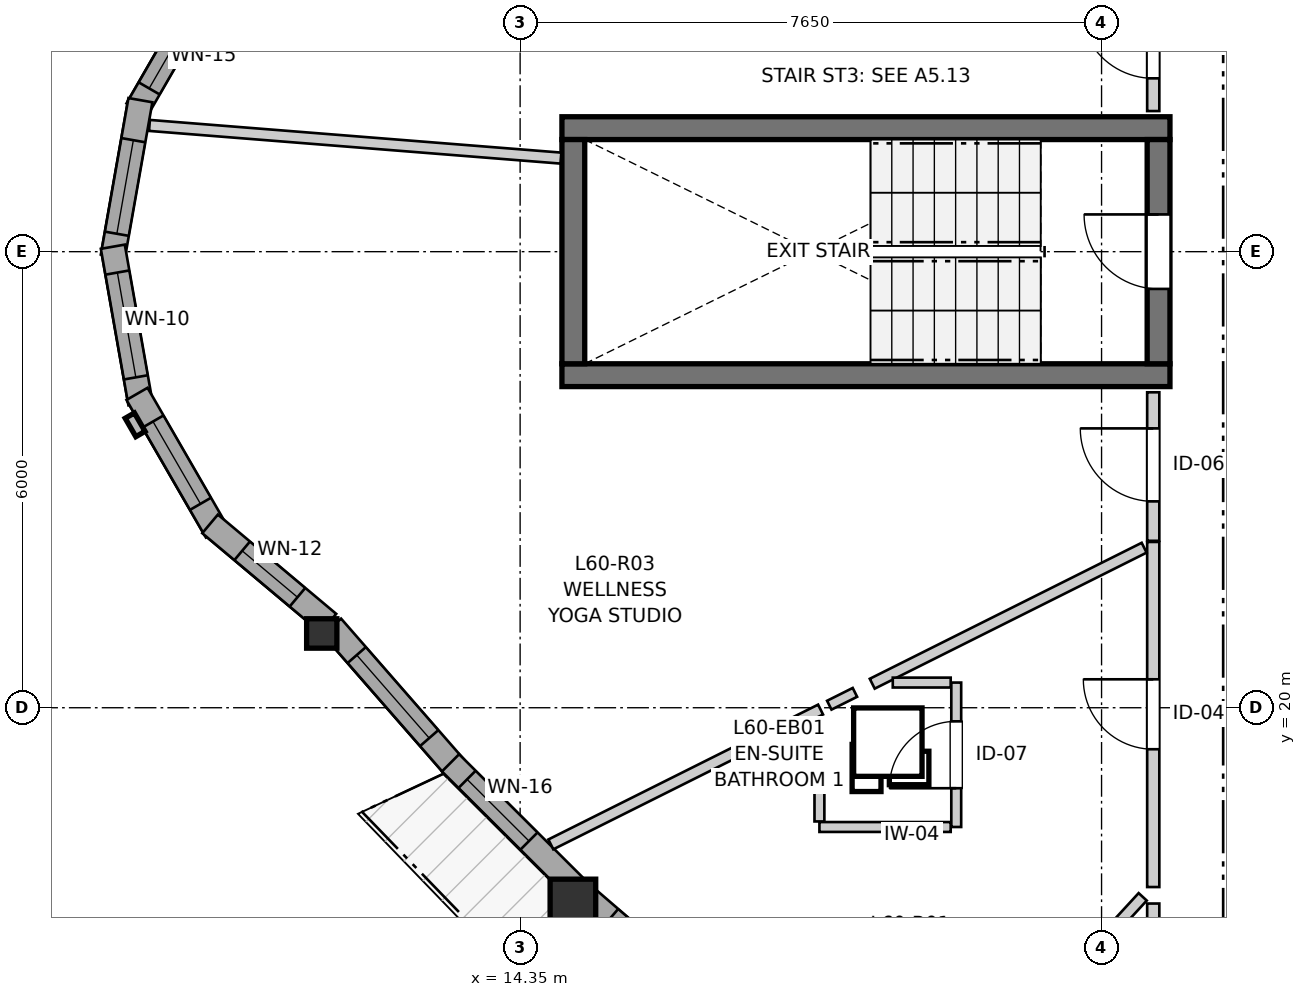
"""IFC4 building model, lengths in metres.
Left out: names, types, materials, properties, quantities, classifications, styles, units other than length and angle.
Written with IfcOpenShell. Run it as: python <this file> out.ifc"""

import sys

from ifc_helpers import new_model, si_unit, direction, frame, frame_2d, origin, origin_2d, place, context, subcontext, project, spatial, rectangle, i_section, extrude, source, transform, mapped, element, fill, save


model = new_model("IFC4")
c1 = context("Model", 3, precision=1e-05, world=origin(), true_north=direction((0.0, 1.0)))
c2 = subcontext(c1, "Body", "Model", "MODEL_VIEW")
j1 = project(units=[si_unit("LENGTHUNIT", "METRE"), si_unit("PLANEANGLEUNIT", "RADIAN")], contexts=[c1])
p1 = place(None, origin())
s1 = spatial("IfcSite", under=j1, at=p1, CompositionType="ELEMENT")
p2 = place(p1, origin())
s2 = spatial("IfcBuilding", under=s1, at=p2, CompositionType="ELEMENT")
p3 = place(p2, frame((0.0, 0.0, 202.0)))
s3 = spatial("IfcBuildingStorey", under=s2, at=p3, CompositionType="ELEMENT", Elevation=202.0)
for number, where, z_axis, x_axis in (
    (1, (14.9, 24.375, 0.0), (0.0, 0.0, 1.0), (1.0, 0.0, 0.0)),
    (2, (22.9, 27.625, 0.0), (0.0, 0.0, 1.0), (-1.0, 0.0, 0.0)),
):
    element("IfcWall", number, at=place(p3, frame(where, z_axis=z_axis, x_axis=x_axis)), inside=s3, PredefinedType="SHEAR", context=c2, shape_type="SweptSolid", body=[
        extrude(rectangle(XDim=8.0, YDim=0.3, at=frame_2d((4.0, 0.0))), origin(), (0.0, 0.0, 1.0), 2.935),
    ])
p4 = place(p3, frame((15.05, 27.475, 0.0), z_axis=(0.0, 0.0, 1.0), x_axis=(0.0, -1.0, 0.0)))
e3 = element("IfcWall", 3, at=p4, inside=s3, PredefinedType="SHEAR", context=c2, shape_type="SweptSolid", body=[
    extrude(rectangle(XDim=2.95, YDim=0.3, at=frame_2d((1.475, 0.0))), origin(), (0.0, 0.0, 1.0), 2.935),
])
p5 = place(p3, frame((22.75, 24.525, 0.0), z_axis=(0.0, 0.0, 1.0), x_axis=(0.0, 1.0, 0.0)))
e4 = element("IfcWall", 4, at=p5, inside=s3, PredefinedType="SHEAR", context=c2, shape_type="SweptSolid", body=[
    extrude(rectangle(XDim=2.95, YDim=0.3, at=frame_2d((1.475, 0.0))), origin(), (0.0, 0.0, 1.0), 2.935),
])
p6 = place(p5, frame((0.985, 0.0, 0.0)))
e5 = element("IfcOpeningElement", 5, at=p6, cuts=e4, PredefinedType="OPENING", context=c2, shape_type="SweptSolid", body=[
    extrude(rectangle(XDim=0.98, YDim=2.15, at=frame_2d((0.49, 1.075))), frame((0.0, 0.16, 0.0), z_axis=(0.0, -1.0, 0.0), x_axis=(1.0, 0.0, 0.0)), (0.0, 0.0, 1.0), 0.32),
])
m1 = source(origin(), c2, "Body", "SweptSolid", [
    extrude(i_section(OverallWidth=0.398, OverallDepth=0.387, WebThickness=0.019, FlangeThickness=0.03, FilletRadius=0.015, at=origin_2d()), origin(), (0.0, 0.0, 1.0), 2.935),
])
p7 = place(p3, frame((11.74, 20.977, 0.0), z_axis=(0.0, 0.0, 1.0), x_axis=(1.0, 0.0, 0.0)))
e6 = element("IfcColumn", 6, at=p7, inside=s3, PredefinedType="PILASTER", context=c2, shape_type="MappedRepresentation", body=[
    mapped(m1, transform((0.0, 0.0, 0.0), x_axis=(1.0, 0.0, 0.0), y_axis=(0.0, 1.0, 0.0), z_axis=(0.0, 0.0, 1.0), scale=1.0)),
])
m2 = source(origin(), c2, "Body", "SweptSolid", [
    extrude(rectangle(XDim=0.6, YDim=0.6, at=origin_2d()), origin(), (0.0, 0.0, 1.0), 2.935),
])
p8 = place(p3, frame((15.044, 17.445, 0.0), z_axis=(0.0, 0.0, 1.0), x_axis=(1.0, 0.0, 0.0)))
e7 = element("IfcColumn", 7, at=p8, inside=s3, PredefinedType="COLUMN", context=c2, shape_type="MappedRepresentation", body=[
    mapped(m2, transform((0.0, 0.0, 0.0), x_axis=(1.0, 0.0, 0.0), y_axis=(0.0, 1.0, 0.0), z_axis=(0.0, 0.0, 1.0), scale=1.0)),
])
p9 = place(p3, frame((10.354, 29.681, 0.0), z_axis=(0.0, 0.0, 1.0), x_axis=(-0.499995423472, -0.866028046028, 0.0)))
e8 = element("IfcWall", 8, at=p9, inside=s3, PredefinedType="SOLIDWALL", context=c2, shape_type="SweptSolid", body=[
    extrude(rectangle(XDim=2.09, YDim=0.32, at=frame_2d((1.045, 0.0))), origin(), (0.0, 0.0, 1.0), 2.555),
])
p10 = place(p9, frame((0.32, 0.0, 0.82)))
e9 = element("IfcOpeningElement", 9, at=p10, cuts=e8, PredefinedType="OPENING", context=c2, shape_type="SweptSolid", body=[
    extrude(rectangle(XDim=1.45, YDim=1.25, at=frame_2d((0.725, 0.625))), frame((0.0, 0.17, 0.0), z_axis=(0.0, -1.0, 0.0), x_axis=(1.0, 0.0, 0.0)), (0.0, 0.0, 1.0), 0.34),
])
p11 = place(p3, frame((9.354, 27.993, 0.0), z_axis=(0.0, 0.0, 1.0), x_axis=(-0.173672066494, -0.984803540469, 0.0)))
e10 = element("IfcWall", 10, at=p11, inside=s3, PredefinedType="SOLIDWALL", context=c2, shape_type="SweptSolid", body=[
    extrude(rectangle(XDim=2.09, YDim=0.32, at=frame_2d((1.045, 0.0))), origin(), (0.0, 0.0, 1.0), 2.555),
])
p12 = place(p11, frame((0.535, 0.0, 0.82)))
e11 = element("IfcOpeningElement", 11, at=p12, cuts=e10, PredefinedType="OPENING", context=c2, shape_type="SweptSolid", body=[
    extrude(rectangle(XDim=1.25, YDim=1.35, at=frame_2d((0.625, 0.675))), frame((0.0, 0.17, 0.0), z_axis=(0.0, -1.0, 0.0), x_axis=(1.0, 0.0, 0.0)), (0.0, 0.0, 1.0), 0.34),
])
p13 = place(p3, frame((8.991, 26.065, 0.0), z_axis=(0.0, 0.0, 1.0), x_axis=(0.173672066494, -0.984803540469, 0.0)))
e12 = element("IfcWall", 12, at=p13, inside=s3, PredefinedType="SOLIDWALL", context=c2, shape_type="SweptSolid", body=[
    extrude(rectangle(XDim=2.09, YDim=0.32, at=frame_2d((1.045, 0.0))), origin(), (0.0, 0.0, 1.0), 2.555),
])
p14 = place(p13, frame((0.345, 0.0, 0.82)))
e13 = element("IfcOpeningElement", 13, at=p14, cuts=e12, PredefinedType="OPENING", context=c2, shape_type="SweptSolid", body=[
    extrude(rectangle(XDim=1.4, YDim=1.35, at=frame_2d((0.7, 0.675))), frame((0.0, 0.17, 0.0), z_axis=(0.0, -1.0, 0.0), x_axis=(1.0, 0.0, 0.0)), (0.0, 0.0, 1.0), 0.34),
])
p15 = place(p3, frame((9.309, 24.129, 0.0), z_axis=(0.0, 0.0, 1.0), x_axis=(0.499995423472, -0.866028046028, 0.0)))
e14 = element("IfcWall", 14, at=p15, inside=s3, PredefinedType="SOLIDWALL", context=c2, shape_type="SweptSolid", body=[
    extrude(rectangle(XDim=2.09, YDim=0.32, at=frame_2d((1.045, 0.0))), origin(), (0.0, 0.0, 1.0), 2.555),
])
p16 = place(p15, frame((0.42, 0.0, 0.82)))
e15 = element("IfcOpeningElement", 15, at=p16, cuts=e14, PredefinedType="OPENING", context=c2, shape_type="SweptSolid", body=[
    extrude(rectangle(XDim=1.25, YDim=1.35, at=frame_2d((0.625, 0.675))), frame((0.0, 0.17, 0.0), z_axis=(0.0, -1.0, 0.0), x_axis=(1.0, 0.0, 0.0)), (0.0, 0.0, 1.0), 0.34),
])
p17 = place(p3, frame((10.271, 22.419, 0.0), z_axis=(0.0, 0.0, 1.0), x_axis=(0.766099948115, -0.642721455608, 0.0)))
e16 = element("IfcWall", 16, at=p17, inside=s3, PredefinedType="SOLIDWALL", context=c2, shape_type="SweptSolid", body=[
    extrude(rectangle(XDim=2.032, YDim=0.32, at=frame_2d((1.016, 0.0))), origin(), (0.0, 0.0, 1.0), 2.555),
])
p18 = place(p17, frame((0.551, 0.0, 0.82)))
e17 = element("IfcOpeningElement", 17, at=p18, cuts=e16, PredefinedType="OPENING", context=c2, shape_type="SweptSolid", body=[
    extrude(rectangle(XDim=0.95, YDim=1.35, at=frame_2d((0.475, 0.675))), frame((0.0, 0.17, 0.0), z_axis=(0.0, -1.0, 0.0), x_axis=(1.0, 0.0, 0.0)), (0.0, 0.0, 1.0), 0.34),
])
p19 = place(p3, frame((11.874, 21.067, 0.0), z_axis=(0.0, 0.0, 1.0), x_axis=(0.657571063417, -0.753392524888, 0.0)))
e18 = element("IfcWall", 18, at=p19, inside=s3, PredefinedType="SOLIDWALL", context=c2, shape_type="SweptSolid", body=[
    extrude(rectangle(XDim=2.464, YDim=0.32, at=frame_2d((1.232, 0.0))), origin(), (0.0, 0.0, 1.0), 2.555),
])
p20 = place(p19, frame((0.497, 0.0, 0.82)))
e19 = element("IfcOpeningElement", 19, at=p20, cuts=e18, PredefinedType="OPENING", context=c2, shape_type="SweptSolid", body=[
    extrude(rectangle(XDim=1.45, YDim=1.25, at=frame_2d((0.725, 0.625))), frame((0.0, 0.17, 0.0), z_axis=(0.0, -1.0, 0.0), x_axis=(1.0, 0.0, 0.0)), (0.0, 0.0, 1.0), 0.34),
])
p21 = place(p3, frame((13.434, 19.275, 0.0), z_axis=(0.0, 0.0, 1.0), x_axis=(0.708408377073, -0.705802784985, 0.0)))
e20 = element("IfcWall", 20, at=p21, inside=s3, PredefinedType="SOLIDWALL", context=c2, shape_type="SweptSolid", body=[
    extrude(rectangle(XDim=2.343, YDim=0.32, at=frame_2d((1.171, 0.0))), origin(), (0.0, 0.0, 1.0), 2.555),
])
p22 = place(p21, frame((0.308, 0.0, 0.82)))
e21 = element("IfcOpeningElement", 21, at=p22, cuts=e20, PredefinedType="OPENING", context=c2, shape_type="SweptSolid", body=[
    extrude(rectangle(XDim=1.15, YDim=1.2, at=frame_2d((0.575, 0.6))), frame((0.0, 0.17, 0.0), z_axis=(0.0, -1.0, 0.0), x_axis=(1.0, 0.0, 0.0)), (0.0, 0.0, 1.0), 0.34),
])
p23 = place(p3, frame((15.217, 17.507, 0.0), z_axis=(0.0, 0.0, 1.0), x_axis=(0.757473216355, -0.652866239366, 0.0)))
e22 = element("IfcWall", 22, at=p23, inside=s3, PredefinedType="SOLIDWALL", context=c2, shape_type="SweptSolid", body=[
    extrude(rectangle(XDim=2.303, YDim=0.32, at=frame_2d((1.152, 0.0))), origin(), (0.0, 0.0, 1.0), 2.555),
])
p24 = place(p23, frame((0.422, 0.0, 0.82)))
e23 = element("IfcOpeningElement", 23, at=p24, cuts=e22, PredefinedType="OPENING", context=c2, shape_type="SweptSolid", body=[
    extrude(rectangle(XDim=1.45, YDim=1.25, at=frame_2d((0.725, 0.625))), frame((0.0, 0.17, 0.0), z_axis=(0.0, -1.0, 0.0), x_axis=(1.0, 0.0, 0.0)), (0.0, 0.0, 1.0), 0.34),
])
p25 = place(p3, frame((22.68, 17.641, 0.0), z_axis=(0.0, 0.0, 1.0), x_axis=(0.0, 1.0, 0.0)))
e24 = element("IfcWall", 24, at=p25, inside=s3, PredefinedType="PARTITIONING", context=c2, shape_type="SweptSolid", body=[
    extrude(rectangle(XDim=4.54, YDim=0.16, at=frame_2d((2.27, 0.0))), origin(), (0.0, 0.0, 1.0), 2.935),
])
p26 = place(p25, frame((1.813, 0.0, 0.0)))
e25 = element("IfcOpeningElement", 25, at=p26, cuts=e24, PredefinedType="OPENING", context=c2, shape_type="SweptSolid", body=[
    extrude(rectangle(XDim=0.92, YDim=2.1, at=frame_2d((0.46, 1.05))), frame((0.0, 0.09, 0.0), z_axis=(0.0, -1.0, 0.0), x_axis=(1.0, 0.0, 0.0)), (0.0, 0.0, 1.0), 0.18),
])
p27 = place(p3, frame((22.68, 22.196, 0.0), z_axis=(0.0, 0.0, 1.0), x_axis=(0.0, 1.0, 0.0)))
e26 = element("IfcWall", 26, at=p27, inside=s3, PredefinedType="PARTITIONING", context=c2, shape_type="SweptSolid", body=[
    extrude(rectangle(XDim=1.954, YDim=0.16, at=frame_2d((0.977, 0.0))), origin(), (0.0, 0.0, 1.0), 2.935),
])
p28 = place(p27, frame((0.519, 0.0, 0.0)))
e27 = element("IfcOpeningElement", 27, at=p28, cuts=e26, PredefinedType="OPENING", context=c2, shape_type="SweptSolid", body=[
    extrude(rectangle(XDim=0.96, YDim=2.1, at=frame_2d((0.48, 1.05))), frame((0.0, 0.09, 0.0), z_axis=(0.0, -1.0, 0.0), x_axis=(1.0, 0.0, 0.0)), (0.0, 0.0, 1.0), 0.18),
])
p29 = place(p3, frame((20.088, 18.431, 0.0), z_axis=(0.0, 0.0, 1.0), x_axis=(0.0, 1.0, 0.0)))
e28 = element("IfcWall", 28, at=p29, inside=s3, PredefinedType="PARTITIONING", context=c2, shape_type="SweptSolid", body=[
    extrude(rectangle(XDim=1.9, YDim=0.13, at=frame_2d((0.95, 0.0))), origin(), (0.0, 0.0, 1.0), 2.935),
])
p30 = place(p29, frame((0.51, 0.0, 0.0)))
e29 = element("IfcOpeningElement", 29, at=p30, cuts=e28, PredefinedType="OPENING", context=c2, shape_type="SweptSolid", body=[
    extrude(rectangle(XDim=0.88, YDim=2.05, at=frame_2d((0.44, 1.025))), frame((0.0, 0.075, 0.0), z_axis=(0.0, -1.0, 0.0), x_axis=(1.0, 0.0, 0.0)), (0.0, 0.0, 1.0), 0.15),
])
p31 = place(p3, frame((22.68, 27.85, 0.0), z_axis=(0.0, 0.0, 1.0), x_axis=(0.0, 1.0, 0.0)))
e30 = element("IfcWall", 30, at=p31, inside=s3, PredefinedType="PARTITIONING", context=c2, shape_type="SweptSolid", body=[
    extrude(rectangle(XDim=1.731, YDim=0.16, at=frame_2d((0.865, 0.0))), origin(), (0.0, 0.0, 1.0), 2.935),
])
p32 = place(p31, frame((0.43, 0.0, 0.0)))
e31 = element("IfcOpeningElement", 31, at=p32, cuts=e30, PredefinedType="OPENING", context=c2, shape_type="SweptSolid", body=[
    extrude(rectangle(XDim=0.96, YDim=2.1, at=frame_2d((0.48, 1.05))), frame((0.0, 0.09, 0.0), z_axis=(0.0, -1.0, 0.0), x_axis=(1.0, 0.0, 0.0)), (0.0, 0.0, 1.0), 0.18),
])
p33 = place(p3, frame((9.473, 27.661, 0.0), z_axis=(0.0, 0.0, 1.0), x_axis=(0.996864548282, -0.079126938392, 0.0)))
e32 = element("IfcWall", 32, at=p33, inside=s3, PredefinedType="PARTITIONING", context=c2, shape_type="SweptSolid", body=[
    extrude(rectangle(XDim=5.43, YDim=0.145, at=frame_2d((2.715, 0.0))), origin(), (0.0, 0.0, 1.0), 2.935),
])
p34 = place(p3, frame((19.625, 14.343, 0.0), z_axis=(0.0, 0.0, 1.0), x_axis=(0.677104421975, 0.735886949023, 0.0)))
e33 = element("IfcWall", 33, at=p34, inside=s3, PredefinedType="PARTITIONING", context=c2, shape_type="SweptSolid", body=[
    extrude(rectangle(XDim=4.307, YDim=0.145, at=frame_2d((2.153, 0.0))), origin(), (0.0, 0.0, 1.0), 2.935),
])
p35 = place(p3, frame((18.983, 20.316, 0.0), z_axis=(0.0, 0.0, 1.0), x_axis=(0.894366146285, 0.447335664104, 0.0)))
e34 = element("IfcWall", 34, at=p35, inside=s3, PredefinedType="PARTITIONING", context=c2, shape_type="SweptSolid", body=[
    extrude(rectangle(XDim=4.0, YDim=0.145, at=frame_2d((2.0, 0.0))), origin(), (0.0, 0.0, 1.0), 2.935),
])
p36 = place(p3, frame((14.754, 18.202, 0.0), z_axis=(0.0, 0.0, 1.0), x_axis=(0.894464106055, 0.44713975777, 0.0)))
e35 = element("IfcWall", 35, at=p36, inside=s3, PredefinedType="PARTITIONING", context=c2, shape_type="SweptSolid", body=[
    extrude(rectangle(XDim=3.968, YDim=0.145, at=frame_2d((1.984, 0.0))), origin(), (0.0, 0.0, 1.0), 2.935),
])
p37 = place(p3, frame((22.68, 15.796, 0.0), z_axis=(0.0, 0.0, 1.0), x_axis=(0.0, 1.0, 0.0)))
e36 = element("IfcWall", 36, at=p37, inside=s3, PredefinedType="PARTITIONING", context=c2, shape_type="SweptSolid", body=[
    extrude(rectangle(XDim=1.628, YDim=0.16, at=frame_2d((0.814, 0.0))), origin(), (0.0, 0.0, 1.0), 2.935),
])
p38 = place(p3, frame((18.288, 18.431, 0.0), z_axis=(0.0, 0.0, 1.0), x_axis=(1.0, 0.0, 0.0)))
e37 = element("IfcWall", 37, at=p38, inside=s3, PredefinedType="PARTITIONING", context=c2, shape_type="SweptSolid", body=[
    extrude(rectangle(XDim=1.727, YDim=0.13, at=frame_2d((0.863, 0.0))), origin(), (0.0, 0.0, 1.0), 2.935),
])
p39 = place(p3, frame((18.288, 18.504, 0.0), z_axis=(0.0, 0.0, 1.0), x_axis=(0.0, 1.0, 0.0)))
e38 = element("IfcWall", 38, at=p39, inside=s3, PredefinedType="PARTITIONING", context=c2, shape_type="SweptSolid", body=[
    extrude(rectangle(XDim=1.344, YDim=0.13, at=frame_2d((0.672, 0.0))), origin(), (0.0, 0.0, 1.0), 2.935),
])
p40 = place(p3, frame((19.253, 20.331, 0.0), z_axis=(0.0, 0.0, 1.0), x_axis=(1.0, 0.0, 0.0)))
e39 = element("IfcWall", 39, at=p40, inside=s3, PredefinedType="PARTITIONING", context=c2, shape_type="SweptSolid", body=[
    extrude(rectangle(XDim=0.762, YDim=0.13, at=frame_2d((0.381, 0.0))), origin(), (0.0, 0.0, 1.0), 2.935),
])
p41 = place(p3, frame((18.417, 20.033, 0.0), z_axis=(0.0, 0.0, 1.0), x_axis=(0.894427191, 0.4472135955, 0.0)))
e40 = element("IfcWall", 40, at=p41, inside=s3, PredefinedType="PARTITIONING", context=c2, shape_type="SweptSolid", body=[
    extrude(rectangle(XDim=0.377, YDim=0.13, at=frame_2d((0.188, 0.0))), origin(), (0.0, 0.0, 1.0), 2.935),
])
m3 = source(origin(), c2, "Body", "SweptSolid", [
    extrude(rectangle(XDim=1.45, YDim=1.25, at=frame_2d((0.725, 0.625))), frame((0.0, 0.03, 0.0), z_axis=(0.0, -1.0, 0.0), x_axis=(1.0, 0.0, 0.0)), (0.0, 0.0, 1.0), 0.06),
])
p42 = place(p10, origin())
e41 = element("IfcWindow", 41, at=p42, inside=s3, PartitioningType="SINGLE_PANEL", PredefinedType="WINDOW", context=c2, shape_type="MappedRepresentation", body=[
    mapped(m3, transform((0.0, 0.0, 0.0), x_axis=(1.0, 0.0, 0.0), y_axis=(0.0, 1.0, 0.0), z_axis=(0.0, 0.0, 1.0), scale=1.0)),
])
fill(e9, e41)
m4 = source(origin(), c2, "Body", "SweptSolid", [
    extrude(rectangle(XDim=1.25, YDim=1.35, at=frame_2d((0.625, 0.675))), frame((0.0, 0.03, 0.0), z_axis=(0.0, -1.0, 0.0), x_axis=(1.0, 0.0, 0.0)), (0.0, 0.0, 1.0), 0.06),
])
p43 = place(p12, origin())
e42 = element("IfcWindow", 42, at=p43, inside=s3, PartitioningType="SINGLE_PANEL", PredefinedType="WINDOW", context=c2, shape_type="MappedRepresentation", body=[
    mapped(m4, transform((0.0, 0.0, 0.0), x_axis=(1.0, 0.0, 0.0), y_axis=(0.0, 1.0, 0.0), z_axis=(0.0, 0.0, 1.0), scale=1.0)),
])
fill(e11, e42)
m5 = source(origin(), c2, "Body", "SweptSolid", [
    extrude(rectangle(XDim=1.4, YDim=1.35, at=frame_2d((0.7, 0.675))), frame((0.0, 0.03, 0.0), z_axis=(0.0, -1.0, 0.0), x_axis=(1.0, 0.0, 0.0)), (0.0, 0.0, 1.0), 0.06),
])
p44 = place(p14, origin())
e43 = element("IfcWindow", 43, at=p44, inside=s3, PartitioningType="SINGLE_PANEL", PredefinedType="WINDOW", context=c2, shape_type="MappedRepresentation", body=[
    mapped(m5, transform((0.0, 0.0, 0.0), x_axis=(1.0, 0.0, 0.0), y_axis=(0.0, 1.0, 0.0), z_axis=(0.0, 0.0, 1.0), scale=1.0)),
])
fill(e13, e43)
p45 = place(p16, origin())
e44 = element("IfcWindow", 44, at=p45, inside=s3, PartitioningType="SINGLE_PANEL", PredefinedType="WINDOW", context=c2, shape_type="MappedRepresentation", body=[
    mapped(m4, transform((0.0, 0.0, 0.0), x_axis=(1.0, 0.0, 0.0), y_axis=(0.0, 1.0, 0.0), z_axis=(0.0, 0.0, 1.0), scale=1.0)),
])
fill(e15, e44)
m6 = source(origin(), c2, "Body", "SweptSolid", [
    extrude(rectangle(XDim=0.95, YDim=1.35, at=frame_2d((0.475, 0.675))), frame((0.0, 0.03, 0.0), z_axis=(0.0, -1.0, 0.0), x_axis=(1.0, 0.0, 0.0)), (0.0, 0.0, 1.0), 0.06),
])
p46 = place(p18, origin())
e45 = element("IfcWindow", 45, at=p46, inside=s3, PartitioningType="SINGLE_PANEL", PredefinedType="WINDOW", context=c2, shape_type="MappedRepresentation", body=[
    mapped(m6, transform((0.0, 0.0, 0.0), x_axis=(1.0, 0.0, 0.0), y_axis=(0.0, 1.0, 0.0), z_axis=(0.0, 0.0, 1.0), scale=1.0)),
])
fill(e17, e45)
p47 = place(p20, origin())
e46 = element("IfcWindow", 46, at=p47, inside=s3, PartitioningType="SINGLE_PANEL", PredefinedType="WINDOW", context=c2, shape_type="MappedRepresentation", body=[
    mapped(m3, transform((0.0, 0.0, 0.0), x_axis=(1.0, 0.0, 0.0), y_axis=(0.0, 1.0, 0.0), z_axis=(0.0, 0.0, 1.0), scale=1.0)),
])
fill(e19, e46)
m7 = source(origin(), c2, "Body", "SweptSolid", [
    extrude(rectangle(XDim=1.15, YDim=1.2, at=frame_2d((0.575, 0.6))), frame((0.0, 0.03, 0.0), z_axis=(0.0, -1.0, 0.0), x_axis=(1.0, 0.0, 0.0)), (0.0, 0.0, 1.0), 0.06),
])
p48 = place(p22, origin())
e47 = element("IfcWindow", 47, at=p48, inside=s3, PartitioningType="SINGLE_PANEL", PredefinedType="WINDOW", context=c2, shape_type="MappedRepresentation", body=[
    mapped(m7, transform((0.0, 0.0, 0.0), x_axis=(1.0, 0.0, 0.0), y_axis=(0.0, 1.0, 0.0), z_axis=(0.0, 0.0, 1.0), scale=1.0)),
])
fill(e21, e47)
p49 = place(p24, origin())
e48 = element("IfcWindow", 48, at=p49, inside=s3, PartitioningType="SINGLE_PANEL", PredefinedType="WINDOW", context=c2, shape_type="MappedRepresentation", body=[
    mapped(m3, transform((0.0, 0.0, 0.0), x_axis=(1.0, 0.0, 0.0), y_axis=(0.0, 1.0, 0.0), z_axis=(0.0, 0.0, 1.0), scale=1.0)),
])
fill(e23, e48)
m8 = source(origin(), c2, "Body", "SweptSolid", [
    extrude(rectangle(XDim=0.98, YDim=2.15, at=frame_2d((0.49, 1.075))), frame((0.0, 0.025, 0.0), z_axis=(0.0, -1.0, 0.0), x_axis=(1.0, 0.0, 0.0)), (0.0, 0.0, 1.0), 0.05),
])
p50 = place(p6, origin())
e49 = element("IfcDoor", 49, at=p50, inside=s3, OperationType="SINGLE_SWING_RIGHT", PredefinedType="DOOR", context=c2, shape_type="MappedRepresentation", body=[
    mapped(m8, transform((0.0, 0.0, 0.0), x_axis=(1.0, 0.0, 0.0), y_axis=(0.0, 1.0, 0.0), z_axis=(0.0, 0.0, 1.0), scale=1.0)),
])
fill(e5, e49)
m9 = source(origin(), c2, "Body", "SweptSolid", [
    extrude(rectangle(XDim=0.92, YDim=2.1, at=frame_2d((0.46, 1.05))), frame((0.0, 0.025, 0.0), z_axis=(0.0, -1.0, 0.0), x_axis=(1.0, 0.0, 0.0)), (0.0, 0.0, 1.0), 0.05),
])
p51 = place(p26, origin())
e50 = element("IfcDoor", 50, at=p51, inside=s3, OperationType="SINGLE_SWING_RIGHT", PredefinedType="DOOR", context=c2, shape_type="MappedRepresentation", body=[
    mapped(m9, transform((0.0, 0.0, 0.0), x_axis=(1.0, 0.0, 0.0), y_axis=(0.0, 1.0, 0.0), z_axis=(0.0, 0.0, 1.0), scale=1.0)),
])
fill(e25, e50)
m10 = source(origin(), c2, "Body", "SweptSolid", [
    extrude(rectangle(XDim=0.96, YDim=2.1, at=frame_2d((0.48, 1.05))), frame((0.0, 0.025, 0.0), z_axis=(0.0, -1.0, 0.0), x_axis=(1.0, 0.0, 0.0)), (0.0, 0.0, 1.0), 0.05),
])
p52 = place(p28, origin())
e51 = element("IfcDoor", 51, at=p52, inside=s3, OperationType="SINGLE_SWING_RIGHT", PredefinedType="DOOR", context=c2, shape_type="MappedRepresentation", body=[
    mapped(m10, transform((0.0, 0.0, 0.0), x_axis=(1.0, 0.0, 0.0), y_axis=(0.0, 1.0, 0.0), z_axis=(0.0, 0.0, 1.0), scale=1.0)),
])
fill(e27, e51)
m11 = source(origin(), c2, "Body", "SweptSolid", [
    extrude(rectangle(XDim=0.88, YDim=2.05, at=frame_2d((0.44, 1.025))), frame((0.0, 0.025, 0.0), z_axis=(0.0, -1.0, 0.0), x_axis=(1.0, 0.0, 0.0)), (0.0, 0.0, 1.0), 0.05),
])
p53 = place(p30, origin())
e52 = element("IfcDoor", 52, at=p53, inside=s3, OperationType="SINGLE_SWING_LEFT", PredefinedType="DOOR", context=c2, shape_type="MappedRepresentation", body=[
    mapped(m11, transform((0.0, 0.0, 0.0), x_axis=(1.0, 0.0, 0.0), y_axis=(0.0, 1.0, 0.0), z_axis=(0.0, 0.0, 1.0), scale=1.0)),
])
fill(e29, e52)
p54 = place(p32, origin())
e53 = element("IfcDoor", 53, at=p54, inside=s3, OperationType="SINGLE_SWING_RIGHT", PredefinedType="DOOR", context=c2, shape_type="MappedRepresentation", body=[
    mapped(m10, transform((0.0, 0.0, 0.0), x_axis=(1.0, 0.0, 0.0), y_axis=(0.0, 1.0, 0.0), z_axis=(0.0, 0.0, 1.0), scale=1.0)),
])
fill(e31, e53)
save(model, sys.argv[1])
